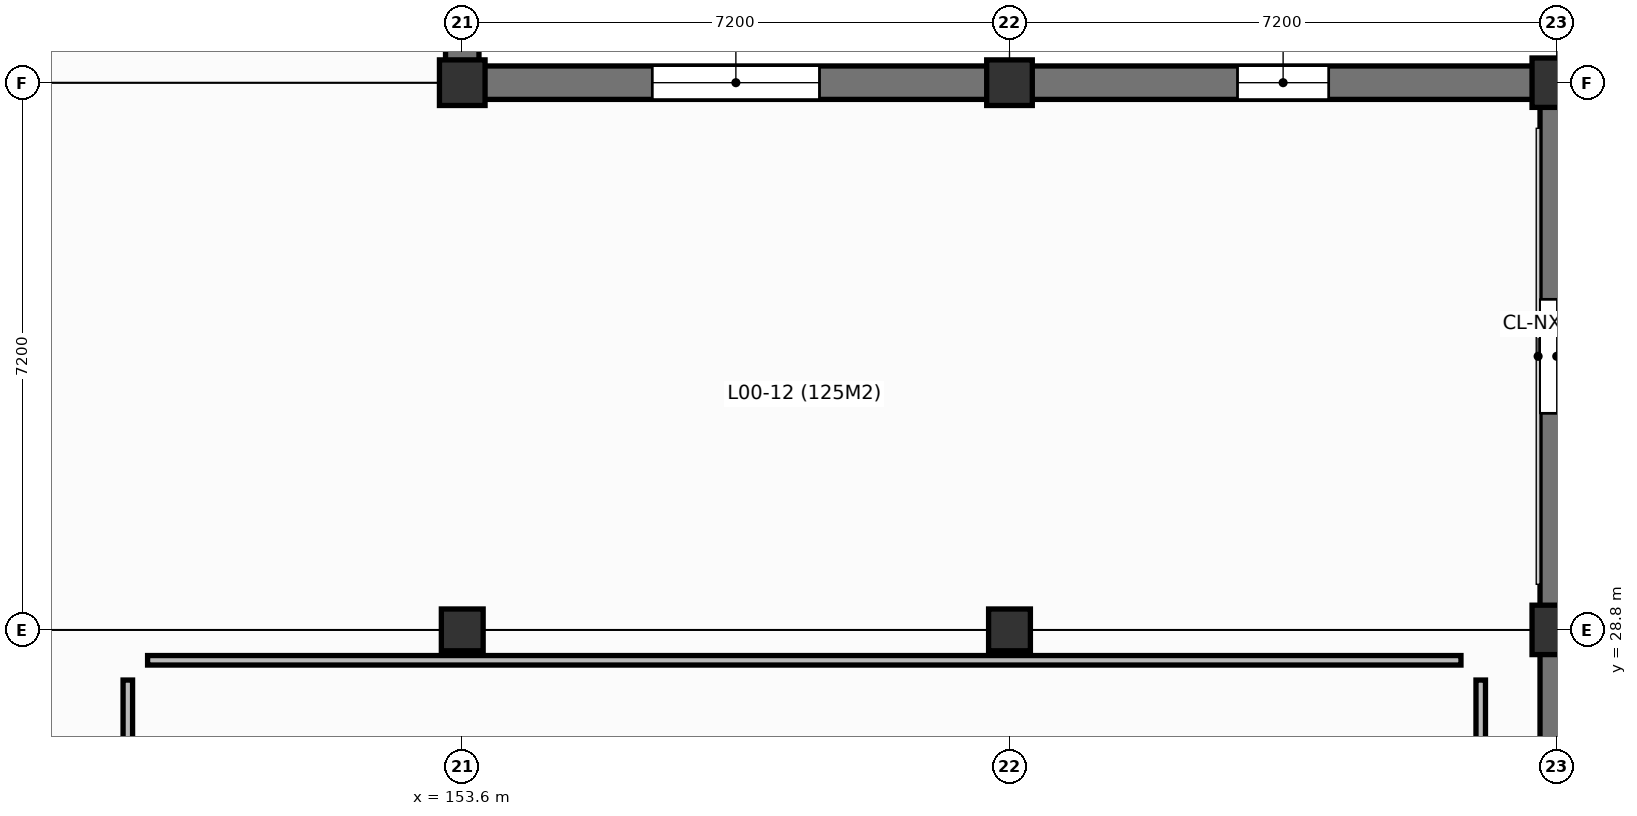
"""IFC4 building model, lengths in metres.
Left out: names, types, materials, properties, quantities, classifications, styles, units other than length and angle.
Written with IfcOpenShell. Run it as: python <this file> out.ifc"""

import sys

from ifc_helpers import new_model, si_unit, direction, frame, frame_2d, origin, origin_2d, place, context, subcontext, project, spatial, rectangle, circle, extrude, element, fill, save


model = new_model("IFC4")
c1 = context("Model", 3, precision=1e-05, world=origin(), true_north=direction((0.0, 1.0)))
c2 = subcontext(c1, "Body", "Model", "MODEL_VIEW")
j1 = project(units=[si_unit("LENGTHUNIT", "METRE"), si_unit("PLANEANGLEUNIT", "RADIAN")], contexts=[c1])
p1 = place(None, origin())
s1 = spatial("IfcSite", under=j1, at=p1, CompositionType="ELEMENT")
p2 = place(p1, origin())
s2 = spatial("IfcBuilding", under=s1, at=p2, CompositionType="ELEMENT")
p3 = place(p2, origin())
s3 = spatial("IfcBuildingStorey", under=s2, at=p3, CompositionType="ELEMENT", Elevation=0.0)
p4 = place(p3, frame((153.6, 28.8, 0.0), z_axis=(0.0, 0.0, 1.0), x_axis=(1.0, 0.0, 0.0)))
e1 = element("IfcColumn", 1, at=p4, inside=s3, PredefinedType="COLUMN", context=c2, shape_type="SweptSolid", body=[
    extrude(rectangle(XDim=0.55, YDim=0.55, at=origin_2d()), origin(), (0.0, 0.0, 1.0), 4.8),
])
p5 = place(p3, frame((153.6, 36.0, 0.0), z_axis=(0.0, 0.0, 1.0), x_axis=(1.0, 0.0, 0.0)))
e2 = element("IfcColumn", 2, at=p5, inside=s3, PredefinedType="COLUMN", context=c2, shape_type="SweptSolid", body=[
    extrude(rectangle(XDim=0.6, YDim=0.6, at=origin_2d()), origin(), (0.0, 0.0, 1.0), 4.8),
])
p6 = place(p3, frame((160.8, 28.8, 0.0), z_axis=(0.0, 0.0, 1.0), x_axis=(1.0, 0.0, 0.0)))
e3 = element("IfcColumn", 3, at=p6, inside=s3, PredefinedType="COLUMN", context=c2, shape_type="SweptSolid", body=[
    extrude(rectangle(XDim=0.55, YDim=0.55, at=origin_2d()), origin(), (0.0, 0.0, 1.0), 4.8),
])
p7 = place(p3, frame((160.8, 36.0, 0.0), z_axis=(0.0, 0.0, 1.0), x_axis=(1.0, 0.0, 0.0)))
e4 = element("IfcColumn", 4, at=p7, inside=s3, PredefinedType="COLUMN", context=c2, shape_type="SweptSolid", body=[
    extrude(rectangle(XDim=0.6, YDim=0.6, at=origin_2d()), origin(), (0.0, 0.0, 1.0), 4.8),
])
for number, where, z_axis, x_axis in (
    (5, (168.0, 28.8, 0.0), (0.0, 0.0, 1.0), (1.0, 0.0, 0.0)),
    (6, (168.0, 36.0, 0.0), (0.0, 0.0, 1.0), (1.0, 0.0, 0.0)),
):
    element("IfcColumn", number, at=place(p3, frame(where, z_axis=z_axis, x_axis=x_axis)), inside=s3, PredefinedType="COLUMN", context=c2, shape_type="SweptSolid", body=[
        extrude(circle(Radius=0.325, at=origin_2d()), origin(), (0.0, 0.0, 1.0), 4.8),
    ])
p8 = place(p3, frame((153.6, 43.2, 0.0), z_axis=(0.0, 0.0, 1.0), x_axis=(0.0, -1.0, 0.0)))
e7 = element("IfcWall", 7, at=p8, inside=s3, PredefinedType="STANDARD", context=c2, shape_type="SweptSolid", body=[
    extrude(rectangle(XDim=7.2, YDim=0.44, at=frame_2d((3.6, 0.0))), origin(), (0.0, 0.0, 1.0), 4.44),
])
p9 = place(p8, frame((2.7, 0.0, 0.8)))
e8 = element("IfcOpeningElement", 8, at=p9, cuts=e7, PredefinedType="OPENING", context=c2, shape_type="SweptSolid", body=[
    extrude(rectangle(XDim=1.8, YDim=2.05, at=frame_2d((0.9, 1.025))), frame((0.0, 0.23, 0.0), z_axis=(0.0, -1.0, 0.0), x_axis=(1.0, 0.0, 0.0)), (0.0, 0.0, 1.0), 0.46),
])
p10 = place(p3, frame((153.6, 36.0, 0.0), z_axis=(0.0, 0.0, 1.0), x_axis=(1.0, 0.0, 0.0)))
e9 = element("IfcWall", 9, at=p10, inside=s3, PredefinedType="STANDARD", context=c2, shape_type="SweptSolid", body=[
    extrude(rectangle(XDim=7.2, YDim=0.44, at=frame_2d((3.6, 0.0))), origin(), (0.0, 0.0, 1.0), 4.44),
])
p11 = place(p10, frame((2.5, 0.0, 0.8)))
e10 = element("IfcOpeningElement", 10, at=p11, cuts=e9, PredefinedType="OPENING", context=c2, shape_type="SweptSolid", body=[
    extrude(rectangle(XDim=2.2, YDim=2.05, at=frame_2d((1.1, 1.025))), frame((0.0, 0.23, 0.0), z_axis=(0.0, -1.0, 0.0), x_axis=(1.0, 0.0, 0.0)), (0.0, 0.0, 1.0), 0.46),
])
p12 = place(p3, frame((160.8, 36.0, 0.0), z_axis=(0.0, 0.0, 1.0), x_axis=(1.0, 0.0, 0.0)))
e11 = element("IfcWall", 11, at=p12, inside=s3, PredefinedType="STANDARD", context=c2, shape_type="SweptSolid", body=[
    extrude(rectangle(XDim=7.2, YDim=0.44, at=frame_2d((3.6, 0.0))), origin(), (0.0, 0.0, 1.0), 4.44),
])
p13 = place(p12, frame((3.0, 0.0, 0.8)))
e12 = element("IfcOpeningElement", 12, at=p13, cuts=e11, PredefinedType="OPENING", context=c2, shape_type="SweptSolid", body=[
    extrude(rectangle(XDim=1.2, YDim=1.65, at=frame_2d((0.6, 0.825))), frame((0.0, 0.23, 0.0), z_axis=(0.0, -1.0, 0.0), x_axis=(1.0, 0.0, 0.0)), (0.0, 0.0, 1.0), 0.46),
])
p14 = place(p3, frame((168.0, 36.0, 0.0), z_axis=(0.0, 0.0, 1.0), x_axis=(0.0, -1.0, 0.0)))
e13 = element("IfcWall", 13, at=p14, inside=s3, PredefinedType="STANDARD", context=c2, shape_type="SweptSolid", body=[
    extrude(rectangle(XDim=7.2, YDim=0.44, at=frame_2d((3.6, 0.0))), origin(), (0.0, 0.0, 1.0), 4.44),
])
p15 = place(p14, frame((2.85, 0.0, 0.8)))
e14 = element("IfcOpeningElement", 14, at=p15, cuts=e13, PredefinedType="OPENING", context=c2, shape_type="SweptSolid", body=[
    extrude(rectangle(XDim=1.5, YDim=1.65, at=frame_2d((0.75, 0.825))), frame((0.0, 0.23, 0.0), z_axis=(0.0, -1.0, 0.0), x_axis=(1.0, 0.0, 0.0)), (0.0, 0.0, 1.0), 0.46),
])
p16 = place(p3, frame((168.0, 28.8, 0.0), z_axis=(0.0, 0.0, 1.0), x_axis=(0.0, -1.0, 0.0)))
e15 = element("IfcWall", 15, at=p16, inside=s3, PredefinedType="STANDARD", context=c2, shape_type="SweptSolid", body=[
    extrude(rectangle(XDim=7.2, YDim=0.44, at=frame_2d((3.6, 0.0))), origin(), (0.0, 0.0, 1.0), 4.44),
])
p17 = place(p16, frame((2.7, 0.0, 0.8)))
e16 = element("IfcOpeningElement", 16, at=p17, cuts=e15, PredefinedType="OPENING", context=c2, shape_type="SweptSolid", body=[
    extrude(rectangle(XDim=1.8, YDim=1.65, at=frame_2d((0.9, 0.825))), frame((0.0, 0.23, 0.0), z_axis=(0.0, -1.0, 0.0), x_axis=(1.0, 0.0, 0.0)), (0.0, 0.0, 1.0), 0.46),
])
p18 = place(p3, frame((167.0, 1.26, 0.0), z_axis=(0.0, 0.0, 1.0), x_axis=(0.0, 1.0, 0.0)))
e17 = element("IfcWall", 17, at=p18, inside=s3, PredefinedType="PARTITIONING", context=c2, shape_type="SweptSolid", body=[
    extrude(rectangle(XDim=26.88, YDim=0.125, at=frame_2d((13.44, 0.0))), origin(), (0.0, 0.0, 1.0), 4.44),
])
p19 = place(p3, frame((166.74, 28.4, 0.0), z_axis=(0.0, 0.0, 1.0), x_axis=(-1.0, 0.0, 0.0)))
e18 = element("IfcWall", 18, at=p19, inside=s3, PredefinedType="PARTITIONING", context=c2, shape_type="SweptSolid", body=[
    extrude(rectangle(XDim=17.28, YDim=0.125, at=frame_2d((8.64, 0.0))), origin(), (0.0, 0.0, 1.0), 3.515),
])
p20 = place(p3, frame((149.2, 28.14, 0.0), z_axis=(0.0, 0.0, 1.0), x_axis=(0.0, -1.0, 0.0)))
e19 = element("IfcWall", 19, at=p20, inside=s3, PredefinedType="PARTITIONING", context=c2, shape_type="SweptSolid", body=[
    extrude(rectangle(XDim=26.88, YDim=0.125, at=frame_2d((13.44, 0.0))), origin(), (0.0, 0.0, 1.0), 4.44),
])
p21 = place(p20, frame((12.59, 0.0, 0.0)))
e20 = element("IfcOpeningElement", 20, at=p21, cuts=e19, PredefinedType="OPENING", context=c2, shape_type="SweptSolid", body=[
    extrude(rectangle(XDim=1.7, YDim=2.2, at=frame_2d((0.85, 1.1))), frame((0.0, 0.073, 0.0), z_axis=(0.0, -1.0, 0.0), x_axis=(1.0, 0.0, 0.0)), (0.0, 0.0, 1.0), 0.145),
])
p22 = place(p11, origin())
e21 = element("IfcWindow", 21, at=p22, inside=s3, PartitioningType="SINGLE_PANEL", PredefinedType="WINDOW", context=c2, shape_type="SweptSolid", body=[
    extrude(rectangle(XDim=2.2, YDim=2.05, at=frame_2d((1.1, 1.025))), frame((0.0, 0.03, 0.0), z_axis=(0.0, -1.0, 0.0), x_axis=(1.0, 0.0, 0.0)), (0.0, 0.0, 1.0), 0.06),
])
fill(e10, e21)
p23 = place(p13, origin())
e22 = element("IfcWindow", 22, at=p23, inside=s3, PartitioningType="SINGLE_PANEL", PredefinedType="WINDOW", context=c2, shape_type="SweptSolid", body=[
    extrude(rectangle(XDim=1.2, YDim=1.65, at=frame_2d((0.6, 0.825))), frame((0.0, 0.03, 0.0), z_axis=(0.0, -1.0, 0.0), x_axis=(1.0, 0.0, 0.0)), (0.0, 0.0, 1.0), 0.06),
])
fill(e12, e22)
p24 = place(p15, origin())
e23 = element("IfcWindow", 23, at=p24, inside=s3, PartitioningType="SINGLE_PANEL", PredefinedType="WINDOW", context=c2, shape_type="SweptSolid", body=[
    extrude(rectangle(XDim=1.5, YDim=1.65, at=frame_2d((0.75, 0.825))), frame((0.0, 0.03, 0.0), z_axis=(0.0, -1.0, 0.0), x_axis=(1.0, 0.0, 0.0)), (0.0, 0.0, 1.0), 0.06),
])
fill(e14, e23)
save(model, sys.argv[1])
